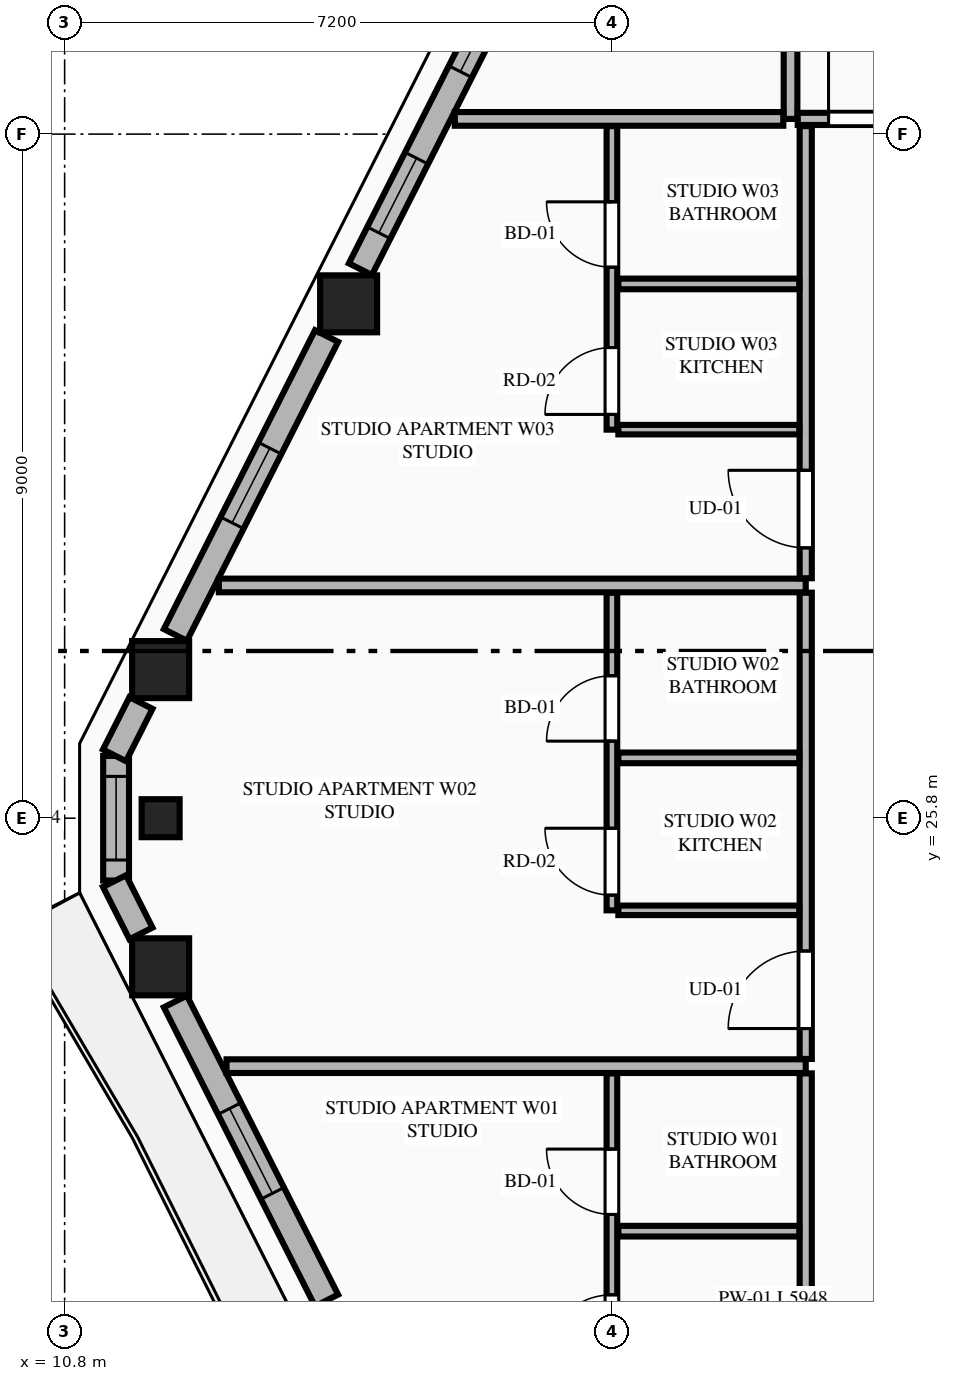
"""IFC4 building model, lengths in metres.
Left out: names, types, materials, properties, quantities, classifications, styles, units other than length and angle.
Written with IfcOpenShell. Run it as: python <this file> out.ifc"""

import sys

from ifc_helpers import new_model, si_unit, direction, frame, frame_2d, origin, origin_2d, place, context, subcontext, project, spatial, rectangle, extrude, element, fill, save


model = new_model("IFC4")
c1 = context("Model", 3, precision=1e-05, world=origin(), true_north=direction((0.0, 1.0)))
c2 = subcontext(c1, "Body", "Model", "MODEL_VIEW")
j1 = project(units=[si_unit("LENGTHUNIT", "METRE"), si_unit("PLANEANGLEUNIT", "RADIAN")], contexts=[c1])
p1 = place(None, origin())
s1 = spatial("IfcSite", under=j1, at=p1, CompositionType="ELEMENT")
p2 = place(p1, origin())
s2 = spatial("IfcBuilding", under=s1, at=p2, CompositionType="ELEMENT")
p3 = place(p2, frame((0.0, 0.0, 245.25)))
s3 = spatial("IfcBuildingStorey", under=s2, at=p3, CompositionType="ELEMENT", Elevation=245.25)
for number, where, z_axis, x_axis in (
    (1, (14.536, 32.567, 0.0), (0.0, 0.0, 1.0), (1.0, 0.0, 0.0)),
    (2, (12.063, 27.755, 0.0), (0.0, 0.0, 1.0), (1.0, 0.0, 0.0)),
    (3, (12.063, 23.845, 0.0), (0.0, 0.0, 1.0), (1.0, 0.0, 0.0)),
):
    element("IfcColumn", number, at=place(p3, frame(where, z_axis=z_axis, x_axis=x_axis)), inside=s3, PredefinedType="COLUMN", context=c2, shape_type="SweptSolid", body=[
        extrude(rectangle(XDim=0.75, YDim=0.75, at=origin_2d()), origin(), (0.0, 0.0, 1.0), 3.65),
    ])
p4 = place(p3, frame((12.063, 25.8, 0.0), z_axis=(0.0, 0.0, 1.0), x_axis=(0.0, -1.0, 0.0)))
e4 = element("IfcColumn", 4, at=p4, inside=s3, PredefinedType="PILASTER", context=c2, shape_type="SweptSolid", body=[
    extrude(rectangle(XDim=0.5, YDim=0.35, at=origin_2d()), origin(), (0.0, 0.0, 1.0), 3.65),
])
p5 = place(p3, frame((11.477, 26.62, 0.0), z_axis=(0.0, 0.0, 1.0), x_axis=(0.0, -1.0, 0.0)))
e5 = element("IfcWall", 5, at=p5, inside=s3, PredefinedType="STANDARD", context=c2, shape_type="SweptSolid", body=[
    extrude(rectangle(XDim=1.64, YDim=0.34, at=frame_2d((0.82, 0.0))), origin(), (0.0, 0.0, 1.0), 3.45),
])
p6 = place(p5, frame((0.27, 0.0, 0.75)))
e6 = element("IfcOpeningElement", 6, at=p6, cuts=e5, PredefinedType="OPENING", context=c2, shape_type="SweptSolid", body=[
    extrude(rectangle(XDim=1.1, YDim=2.0, at=frame_2d((0.55, 1.0))), frame((0.0, 0.18, 0.0), z_axis=(0.0, -1.0, 0.0), x_axis=(1.0, 0.0, 0.0)), (0.0, 0.0, 1.0), 0.36),
])
p7 = place(p3, frame((16.768, 37.127, 0.0), z_axis=(0.0, 0.0, 1.0), x_axis=(-0.451581819983, -0.892229712496, 0.0)))
e7 = element("IfcWall", 7, at=p7, inside=s3, PredefinedType="STANDARD", context=c2, shape_type="SweptSolid", body=[
    extrude(rectangle(XDim=4.6, YDim=0.34, at=frame_2d((2.3, 0.0))), origin(), (0.0, 0.0, 1.0), 2.983),
])
p8 = place(p7, frame((0.437, 0.0, 0.75)))
e8 = element("IfcOpeningElement", 8, at=p8, cuts=e7, PredefinedType="OPENING", context=c2, shape_type="SweptSolid", body=[
    extrude(rectangle(XDim=1.25, YDim=1.95, at=frame_2d((0.625, 0.975))), frame((0.0, 0.18, 0.0), z_axis=(0.0, -1.0, 0.0), x_axis=(1.0, 0.0, 0.0)), (0.0, 0.0, 1.0), 0.36),
])
p9 = place(p7, frame((2.963, 0.0, 0.75)))
e9 = element("IfcOpeningElement", 9, at=p9, cuts=e7, PredefinedType="OPENING", context=c2, shape_type="SweptSolid", body=[
    extrude(rectangle(XDim=1.1, YDim=2.0, at=frame_2d((0.55, 1.0))), frame((0.0, 0.18, 0.0), z_axis=(0.0, -1.0, 0.0), x_axis=(1.0, 0.0, 0.0)), (0.0, 0.0, 1.0), 0.36),
])
p10 = place(p3, frame((14.246, 32.144, 0.0), z_axis=(0.0, 0.0, 1.0), x_axis=(-0.451285866323, -0.892379441077, 0.0)))
e10 = element("IfcWall", 10, at=p10, inside=s3, PredefinedType="STANDARD", context=c2, shape_type="SweptSolid", body=[
    extrude(rectangle(XDim=4.407, YDim=0.34, at=frame_2d((2.204, 0.0))), origin(), (0.0, 0.0, 1.0), 2.983),
])
p11 = place(p10, frame((1.654, 0.0, 0.75)))
e11 = element("IfcOpeningElement", 11, at=p11, cuts=e10, PredefinedType="OPENING", context=c2, shape_type="SweptSolid", body=[
    extrude(rectangle(XDim=1.1, YDim=2.0, at=frame_2d((0.55, 1.0))), frame((0.0, 0.18, 0.0), z_axis=(0.0, -1.0, 0.0), x_axis=(1.0, 0.0, 0.0)), (0.0, 0.0, 1.0), 0.36),
])
for number, where, z_axis, x_axis in (
    (12, (11.804, 27.316, 0.0), (0.0, 0.0, 1.0), (-0.451, -0.893, 0.0)),
    (13, (11.456, 24.973, 0.0), (0.0, 0.0, 1.0), (0.451, -0.893, 0.0)),
):
    element("IfcWall", number, at=place(p3, frame(where, z_axis=z_axis, x_axis=x_axis)), inside=s3, PredefinedType="STANDARD", context=c2, shape_type="SweptSolid", body=[
        extrude(rectangle(XDim=0.772, YDim=0.34, at=frame_2d((0.386, 0.0))), origin(), (0.0, 0.0, 1.0), 3.45),
    ])
p12 = place(p3, frame((12.257, 23.389, 0.0), z_axis=(0.0, 0.0, 1.0), x_axis=(0.45130817501, -0.892368158984, 0.0)))
e14 = element("IfcWall", 14, at=p12, inside=s3, PredefinedType="STANDARD", context=c2, shape_type="SweptSolid", body=[
    extrude(rectangle(XDim=4.407, YDim=0.34, at=frame_2d((2.204, 0.0))), origin(), (0.0, 0.0, 1.0), 2.983),
])
p13 = place(p12, frame((1.579, 0.0, 0.75)))
e15 = element("IfcOpeningElement", 15, at=p13, cuts=e14, PredefinedType="OPENING", context=c2, shape_type="SweptSolid", body=[
    extrude(rectangle(XDim=1.25, YDim=1.95, at=frame_2d((0.625, 0.975))), frame((0.0, 0.18, 0.0), z_axis=(0.0, -1.0, 0.0), x_axis=(1.0, 0.0, 0.0)), (0.0, 0.0, 1.0), 0.36),
])
p14 = place(p3, frame((20.35, 35.0, 0.0), z_axis=(0.0, 0.0, 1.0), x_axis=(0.0, 1.0, 0.0)))
e16 = element("IfcWall", 16, at=p14, inside=s3, PredefinedType="PARTITIONING", context=c2, shape_type="SweptSolid", body=[
    extrude(rectangle(XDim=8.481, YDim=0.18, at=frame_2d((4.24, 0.0))), origin(), (0.0, 0.0, 1.0), 3.45),
])
p15 = place(p3, frame((20.445, 35.0, 0.0), z_axis=(0.0, 0.0, 1.0), x_axis=(1.0, 0.0, 0.0)))
e17 = element("IfcWall", 17, at=p15, inside=s3, PredefinedType="PARTITIONING", context=c2, shape_type="SweptSolid", body=[
    extrude(rectangle(XDim=23.91, YDim=0.16, at=frame_2d((11.955, 0.0))), origin(), (0.0, 0.0, 1.0), 3.45),
])
p16 = place(p15, frame((0.405, 0.0, 0.0)))
e18 = element("IfcOpeningElement", 18, at=p16, cuts=e17, PredefinedType="OPENING", context=c2, shape_type="SweptSolid", body=[
    extrude(rectangle(XDim=1.35, YDim=2.35, at=frame_2d((0.675, 1.175))), frame((0.0, 0.09, 0.0), z_axis=(0.0, -1.0, 0.0), x_axis=(1.0, 0.0, 0.0)), (0.0, 0.0, 1.0), 0.18),
])
p17 = place(p3, frame((15.933, 35.0, 0.0), z_axis=(0.0, 0.0, 1.0), x_axis=(1.0, 0.0, 0.0)))
e19 = element("IfcWall", 19, at=p17, inside=s3, PredefinedType="PARTITIONING", context=c2, shape_type="SweptSolid", body=[
    extrude(rectangle(XDim=4.322, YDim=0.18, at=frame_2d((2.161, 0.0))), origin(), (0.0, 0.0, 1.0), 3.45),
])
p18 = place(p3, frame((20.55, 16.495, 0.0), z_axis=(0.0, 0.0, 1.0), x_axis=(0.0, 1.0, 0.0)))
e20 = element("IfcWall", 20, at=p18, inside=s3, PredefinedType="PARTITIONING", context=c2, shape_type="SweptSolid", body=[
    extrude(rectangle(XDim=5.948, YDim=0.16, at=frame_2d((2.974, 0.0))), origin(), (0.0, 0.0, 1.0), 3.137),
])
p19 = place(p18, frame((0.4, 0.0, 0.0)))
e21 = element("IfcOpeningElement", 21, at=p19, cuts=e20, PredefinedType="OPENING", context=c2, shape_type="SweptSolid", body=[
    extrude(rectangle(XDim=1.02, YDim=2.25, at=frame_2d((0.51, 1.125))), frame((0.0, 0.09, 0.0), z_axis=(0.0, -1.0, 0.0), x_axis=(1.0, 0.0, 0.0)), (0.0, 0.0, 1.0), 0.18),
])
p20 = place(p3, frame((18.0, 18.45, 0.0), z_axis=(0.0, 0.0, 1.0), x_axis=(0.0, 1.0, 0.0)))
e22 = element("IfcWall", 22, at=p20, inside=s3, PredefinedType="PLUMBINGWALL", context=c2, shape_type="SweptSolid", body=[
    extrude(rectangle(XDim=3.993, YDim=0.14, at=frame_2d((1.997, 0.0))), origin(), (0.0, 0.0, 1.0), 3.45),
])
p21 = place(p20, frame((2.137, 0.0, 0.0)))
e23 = element("IfcOpeningElement", 23, at=p21, cuts=e22, PredefinedType="OPENING", context=c2, shape_type="SweptSolid", body=[
    extrude(rectangle(XDim=0.86, YDim=2.1, at=frame_2d((0.43, 1.05))), frame((0.0, 0.08, 0.0), z_axis=(0.0, -1.0, 0.0), x_axis=(1.0, 0.0, 0.0)), (0.0, 0.0, 1.0), 0.16),
])
p22 = place(p20, frame((0.2, 0.0, 0.0)))
e24 = element("IfcOpeningElement", 24, at=p22, cuts=e22, PredefinedType="OPENING", context=c2, shape_type="SweptSolid", body=[
    extrude(rectangle(XDim=0.88, YDim=2.15, at=frame_2d((0.44, 1.075))), frame((0.0, 0.08, 0.0), z_axis=(0.0, -1.0, 0.0), x_axis=(1.0, 0.0, 0.0)), (0.0, 0.0, 1.0), 0.16),
])
p23 = place(p3, frame((18.085, 20.367, 0.0), z_axis=(0.0, 0.0, 1.0), x_axis=(1.0, 0.0, 0.0)))
e25 = element("IfcWall", 25, at=p23, inside=s3, PredefinedType="PLUMBINGWALL", context=c2, shape_type="SweptSolid", body=[
    extrude(rectangle(XDim=2.38, YDim=0.14, at=frame_2d((1.19, 0.0))), origin(), (0.0, 0.0, 1.0), 3.45),
])
p24 = place(p3, frame((12.93, 22.538, 0.0), z_axis=(0.0, 0.0, 1.0), x_axis=(1.0, 0.0, 0.0)))
e26 = element("IfcWall", 26, at=p24, inside=s3, PredefinedType="PARTITIONING", context=c2, shape_type="SweptSolid", body=[
    extrude(rectangle(XDim=7.62, YDim=0.18, at=frame_2d((3.81, 0.0))), origin(), (0.0, 0.0, 1.0), 3.45),
])
p25 = place(p3, frame((20.55, 22.633, 0.0), z_axis=(0.0, 0.0, 1.0), x_axis=(0.0, 1.0, 0.0)))
e27 = element("IfcWall", 27, at=p25, inside=s3, PredefinedType="PARTITIONING", context=c2, shape_type="SweptSolid", body=[
    extrude(rectangle(XDim=6.134, YDim=0.16, at=frame_2d((3.067, 0.0))), origin(), (0.0, 0.0, 1.0), 3.137),
])
p26 = place(p25, frame((0.4, 0.0, 0.0)))
e28 = element("IfcOpeningElement", 28, at=p26, cuts=e27, PredefinedType="OPENING", context=c2, shape_type="SweptSolid", body=[
    extrude(rectangle(XDim=1.02, YDim=2.25, at=frame_2d((0.51, 1.125))), frame((0.0, 0.09, 0.0), z_axis=(0.0, -1.0, 0.0), x_axis=(1.0, 0.0, 0.0)), (0.0, 0.0, 1.0), 0.18),
])
p27 = place(p3, frame((18.085, 24.588, 0.0), z_axis=(0.0, 0.0, 1.0), x_axis=(1.0, 0.0, 0.0)))
e29 = element("IfcWall", 29, at=p27, inside=s3, PredefinedType="PARTITIONING", context=c2, shape_type="SweptSolid", body=[
    extrude(rectangle(XDim=2.38, YDim=0.125, at=frame_2d((1.19, 0.0))), origin(), (0.0, 0.0, 1.0), 3.45),
])
p28 = place(p3, frame((18.0, 24.588, 0.0), z_axis=(0.0, 0.0, 1.0), x_axis=(0.0, 1.0, 0.0)))
e30 = element("IfcWall", 30, at=p28, inside=s3, PredefinedType="PLUMBINGWALL", context=c2, shape_type="SweptSolid", body=[
    extrude(rectangle(XDim=4.179, YDim=0.14, at=frame_2d((2.09, 0.0))), origin(), (0.0, 0.0, 1.0), 3.45),
])
p29 = place(p28, frame((2.226, 0.0, 0.0)))
e31 = element("IfcOpeningElement", 31, at=p29, cuts=e30, PredefinedType="OPENING", context=c2, shape_type="SweptSolid", body=[
    extrude(rectangle(XDim=0.86, YDim=2.1, at=frame_2d((0.43, 1.05))), frame((0.0, 0.08, 0.0), z_axis=(0.0, -1.0, 0.0), x_axis=(1.0, 0.0, 0.0)), (0.0, 0.0, 1.0), 0.16),
])
p30 = place(p28, frame((0.2, 0.0, 0.0)))
e32 = element("IfcOpeningElement", 32, at=p30, cuts=e30, PredefinedType="OPENING", context=c2, shape_type="SweptSolid", body=[
    extrude(rectangle(XDim=0.88, YDim=2.15, at=frame_2d((0.44, 1.075))), frame((0.0, 0.08, 0.0), z_axis=(0.0, -1.0, 0.0), x_axis=(1.0, 0.0, 0.0)), (0.0, 0.0, 1.0), 0.16),
])
p31 = place(p3, frame((18.085, 26.594, 0.0), z_axis=(0.0, 0.0, 1.0), x_axis=(1.0, 0.0, 0.0)))
e33 = element("IfcWall", 33, at=p31, inside=s3, PredefinedType="PLUMBINGWALL", context=c2, shape_type="SweptSolid", body=[
    extrude(rectangle(XDim=2.38, YDim=0.14, at=frame_2d((1.19, 0.0))), origin(), (0.0, 0.0, 1.0), 3.45),
])
p32 = place(p3, frame((12.829, 28.862, 0.0), z_axis=(0.0, 0.0, 1.0), x_axis=(1.0, 0.0, 0.0)))
e34 = element("IfcWall", 34, at=p32, inside=s3, PredefinedType="PARTITIONING", context=c2, shape_type="SweptSolid", body=[
    extrude(rectangle(XDim=7.721, YDim=0.18, at=frame_2d((3.86, 0.0))), origin(), (0.0, 0.0, 1.0), 3.45),
])
p33 = place(p3, frame((20.55, 28.957, 0.0), z_axis=(0.0, 0.0, 1.0), x_axis=(0.0, 1.0, 0.0)))
e35 = element("IfcWall", 35, at=p33, inside=s3, PredefinedType="PARTITIONING", context=c2, shape_type="SweptSolid", body=[
    extrude(rectangle(XDim=5.948, YDim=0.16, at=frame_2d((2.974, 0.0))), origin(), (0.0, 0.0, 1.0), 3.137),
])
p34 = place(p33, frame((0.4, 0.0, 0.0)))
e36 = element("IfcOpeningElement", 36, at=p34, cuts=e35, PredefinedType="OPENING", context=c2, shape_type="SweptSolid", body=[
    extrude(rectangle(XDim=1.02, YDim=2.25, at=frame_2d((0.51, 1.125))), frame((0.0, 0.09, 0.0), z_axis=(0.0, -1.0, 0.0), x_axis=(1.0, 0.0, 0.0)), (0.0, 0.0, 1.0), 0.18),
])
p35 = place(p3, frame((18.085, 30.912, 0.0), z_axis=(0.0, 0.0, 1.0), x_axis=(1.0, 0.0, 0.0)))
e37 = element("IfcWall", 37, at=p35, inside=s3, PredefinedType="PARTITIONING", context=c2, shape_type="SweptSolid", body=[
    extrude(rectangle(XDim=2.38, YDim=0.125, at=frame_2d((1.19, 0.0))), origin(), (0.0, 0.0, 1.0), 3.45),
])
p36 = place(p3, frame((18.0, 30.912, 0.0), z_axis=(0.0, 0.0, 1.0), x_axis=(0.0, 1.0, 0.0)))
e38 = element("IfcWall", 38, at=p36, inside=s3, PredefinedType="PLUMBINGWALL", context=c2, shape_type="SweptSolid", body=[
    extrude(rectangle(XDim=3.993, YDim=0.14, at=frame_2d((1.997, 0.0))), origin(), (0.0, 0.0, 1.0), 3.45),
])
p37 = place(p36, frame((2.137, 0.0, 0.0)))
e39 = element("IfcOpeningElement", 39, at=p37, cuts=e38, PredefinedType="OPENING", context=c2, shape_type="SweptSolid", body=[
    extrude(rectangle(XDim=0.86, YDim=2.1, at=frame_2d((0.43, 1.05))), frame((0.0, 0.08, 0.0), z_axis=(0.0, -1.0, 0.0), x_axis=(1.0, 0.0, 0.0)), (0.0, 0.0, 1.0), 0.16),
])
p38 = place(p36, frame((0.2, 0.0, 0.0)))
e40 = element("IfcOpeningElement", 40, at=p38, cuts=e38, PredefinedType="OPENING", context=c2, shape_type="SweptSolid", body=[
    extrude(rectangle(XDim=0.88, YDim=2.15, at=frame_2d((0.44, 1.075))), frame((0.0, 0.08, 0.0), z_axis=(0.0, -1.0, 0.0), x_axis=(1.0, 0.0, 0.0)), (0.0, 0.0, 1.0), 0.16),
])
p39 = place(p3, frame((18.085, 32.829, 0.0), z_axis=(0.0, 0.0, 1.0), x_axis=(1.0, 0.0, 0.0)))
e41 = element("IfcWall", 41, at=p39, inside=s3, PredefinedType="PLUMBINGWALL", context=c2, shape_type="SweptSolid", body=[
    extrude(rectangle(XDim=2.38, YDim=0.14, at=frame_2d((1.19, 0.0))), origin(), (0.0, 0.0, 1.0), 3.45),
])
p40 = place(p8, origin())
e42 = element("IfcWindow", 42, at=p40, inside=s3, PartitioningType="SINGLE_PANEL", PredefinedType="WINDOW", context=c2, shape_type="SweptSolid", body=[
    extrude(rectangle(XDim=1.25, YDim=1.95, at=frame_2d((0.625, 0.975))), frame((0.0, 0.03, 0.0), z_axis=(0.0, -1.0, 0.0), x_axis=(1.0, 0.0, 0.0)), (0.0, 0.0, 1.0), 0.06),
])
fill(e8, e42)
p41 = place(p11, origin())
e43 = element("IfcWindow", 43, at=p41, inside=s3, PartitioningType="SINGLE_PANEL", PredefinedType="WINDOW", context=c2, shape_type="SweptSolid", body=[
    extrude(rectangle(XDim=1.1, YDim=2.0, at=frame_2d((0.55, 1.0))), frame((0.0, 0.03, 0.0), z_axis=(0.0, -1.0, 0.0), x_axis=(1.0, 0.0, 0.0)), (0.0, 0.0, 1.0), 0.06),
])
fill(e11, e43)
p42 = place(p13, origin())
e44 = element("IfcWindow", 44, at=p42, inside=s3, PartitioningType="SINGLE_PANEL", PredefinedType="WINDOW", context=c2, shape_type="SweptSolid", body=[
    extrude(rectangle(XDim=1.25, YDim=1.95, at=frame_2d((0.625, 0.975))), frame((0.0, 0.03, 0.0), z_axis=(0.0, -1.0, 0.0), x_axis=(1.0, 0.0, 0.0)), (0.0, 0.0, 1.0), 0.06),
])
fill(e15, e44)
p43 = place(p16, origin())
e45 = element("IfcDoor", 45, at=p43, inside=s3, OperationType="SINGLE_SWING_LEFT", PredefinedType="DOOR", context=c2, shape_type="SweptSolid", body=[
    extrude(rectangle(XDim=1.35, YDim=2.35, at=frame_2d((0.675, 1.175))), frame((0.0, 0.025, 0.0), z_axis=(0.0, -1.0, 0.0), x_axis=(1.0, 0.0, 0.0)), (0.0, 0.0, 1.0), 0.05),
])
fill(e18, e45)
p44 = place(p21, origin())
e46 = element("IfcDoor", 46, at=p44, inside=s3, OperationType="SINGLE_SWING_RIGHT", PredefinedType="DOOR", context=c2, shape_type="SweptSolid", body=[
    extrude(rectangle(XDim=0.86, YDim=2.1, at=frame_2d((0.43, 1.05))), frame((0.0, 0.025, 0.0), z_axis=(0.0, -1.0, 0.0), x_axis=(1.0, 0.0, 0.0)), (0.0, 0.0, 1.0), 0.05),
])
fill(e23, e46)
p45 = place(p22, origin())
e47 = element("IfcDoor", 47, at=p45, inside=s3, OperationType="SINGLE_SWING_LEFT", PredefinedType="DOOR", context=c2, shape_type="SweptSolid", body=[
    extrude(rectangle(XDim=0.88, YDim=2.15, at=frame_2d((0.44, 1.075))), frame((0.0, 0.025, 0.0), z_axis=(0.0, -1.0, 0.0), x_axis=(1.0, 0.0, 0.0)), (0.0, 0.0, 1.0), 0.05),
])
fill(e24, e47)
p46 = place(p29, origin())
e48 = element("IfcDoor", 48, at=p46, inside=s3, OperationType="SINGLE_SWING_LEFT", PredefinedType="DOOR", context=c2, shape_type="SweptSolid", body=[
    extrude(rectangle(XDim=0.86, YDim=2.1, at=frame_2d((0.43, 1.05))), frame((0.0, 0.025, 0.0), z_axis=(0.0, -1.0, 0.0), x_axis=(1.0, 0.0, 0.0)), (0.0, 0.0, 1.0), 0.05),
])
fill(e31, e48)
p47 = place(p26, origin())
e49 = element("IfcDoor", 49, at=p47, inside=s3, OperationType="SINGLE_SWING_LEFT", PredefinedType="DOOR", context=c2, shape_type="SweptSolid", body=[
    extrude(rectangle(XDim=1.02, YDim=2.25, at=frame_2d((0.51, 1.125))), frame((0.0, 0.025, 0.0), z_axis=(0.0, -1.0, 0.0), x_axis=(1.0, 0.0, 0.0)), (0.0, 0.0, 1.0), 0.05),
])
fill(e28, e49)
p48 = place(p30, origin())
e50 = element("IfcDoor", 50, at=p48, inside=s3, OperationType="SINGLE_SWING_RIGHT", PredefinedType="DOOR", context=c2, shape_type="SweptSolid", body=[
    extrude(rectangle(XDim=0.88, YDim=2.15, at=frame_2d((0.44, 1.075))), frame((0.0, 0.025, 0.0), z_axis=(0.0, -1.0, 0.0), x_axis=(1.0, 0.0, 0.0)), (0.0, 0.0, 1.0), 0.05),
])
fill(e32, e50)
p49 = place(p37, origin())
e51 = element("IfcDoor", 51, at=p49, inside=s3, OperationType="SINGLE_SWING_RIGHT", PredefinedType="DOOR", context=c2, shape_type="SweptSolid", body=[
    extrude(rectangle(XDim=0.86, YDim=2.1, at=frame_2d((0.43, 1.05))), frame((0.0, 0.025, 0.0), z_axis=(0.0, -1.0, 0.0), x_axis=(1.0, 0.0, 0.0)), (0.0, 0.0, 1.0), 0.05),
])
fill(e39, e51)
p50 = place(p34, origin())
e52 = element("IfcDoor", 52, at=p50, inside=s3, OperationType="SINGLE_SWING_RIGHT", PredefinedType="DOOR", context=c2, shape_type="SweptSolid", body=[
    extrude(rectangle(XDim=1.02, YDim=2.25, at=frame_2d((0.51, 1.125))), frame((0.0, 0.025, 0.0), z_axis=(0.0, -1.0, 0.0), x_axis=(1.0, 0.0, 0.0)), (0.0, 0.0, 1.0), 0.05),
])
fill(e36, e52)
p51 = place(p38, origin())
e53 = element("IfcDoor", 53, at=p51, inside=s3, OperationType="SINGLE_SWING_LEFT", PredefinedType="DOOR", context=c2, shape_type="SweptSolid", body=[
    extrude(rectangle(XDim=0.88, YDim=2.15, at=frame_2d((0.44, 1.075))), frame((0.0, 0.025, 0.0), z_axis=(0.0, -1.0, 0.0), x_axis=(1.0, 0.0, 0.0)), (0.0, 0.0, 1.0), 0.05),
])
fill(e40, e53)
p52 = place(p9, origin())
e54 = element("IfcWindow", 54, at=p52, inside=s3, PartitioningType="SINGLE_PANEL", PredefinedType="WINDOW", context=c2, shape_type="SweptSolid", body=[
    extrude(rectangle(XDim=1.1, YDim=2.0, at=frame_2d((0.55, 1.0))), frame((0.0, 0.03, 0.0), z_axis=(0.0, -1.0, 0.0), x_axis=(1.0, 0.0, 0.0)), (0.0, 0.0, 1.0), 0.06),
])
fill(e9, e54)
p53 = place(p6, origin())
e55 = element("IfcWindow", 55, at=p53, inside=s3, PartitioningType="SINGLE_PANEL", PredefinedType="WINDOW", context=c2, shape_type="SweptSolid", body=[
    extrude(rectangle(XDim=1.1, YDim=2.0, at=frame_2d((0.55, 1.0))), frame((0.0, 0.03, 0.0), z_axis=(0.0, -1.0, 0.0), x_axis=(1.0, 0.0, 0.0)), (0.0, 0.0, 1.0), 0.06),
])
fill(e6, e55)
save(model, sys.argv[1])
